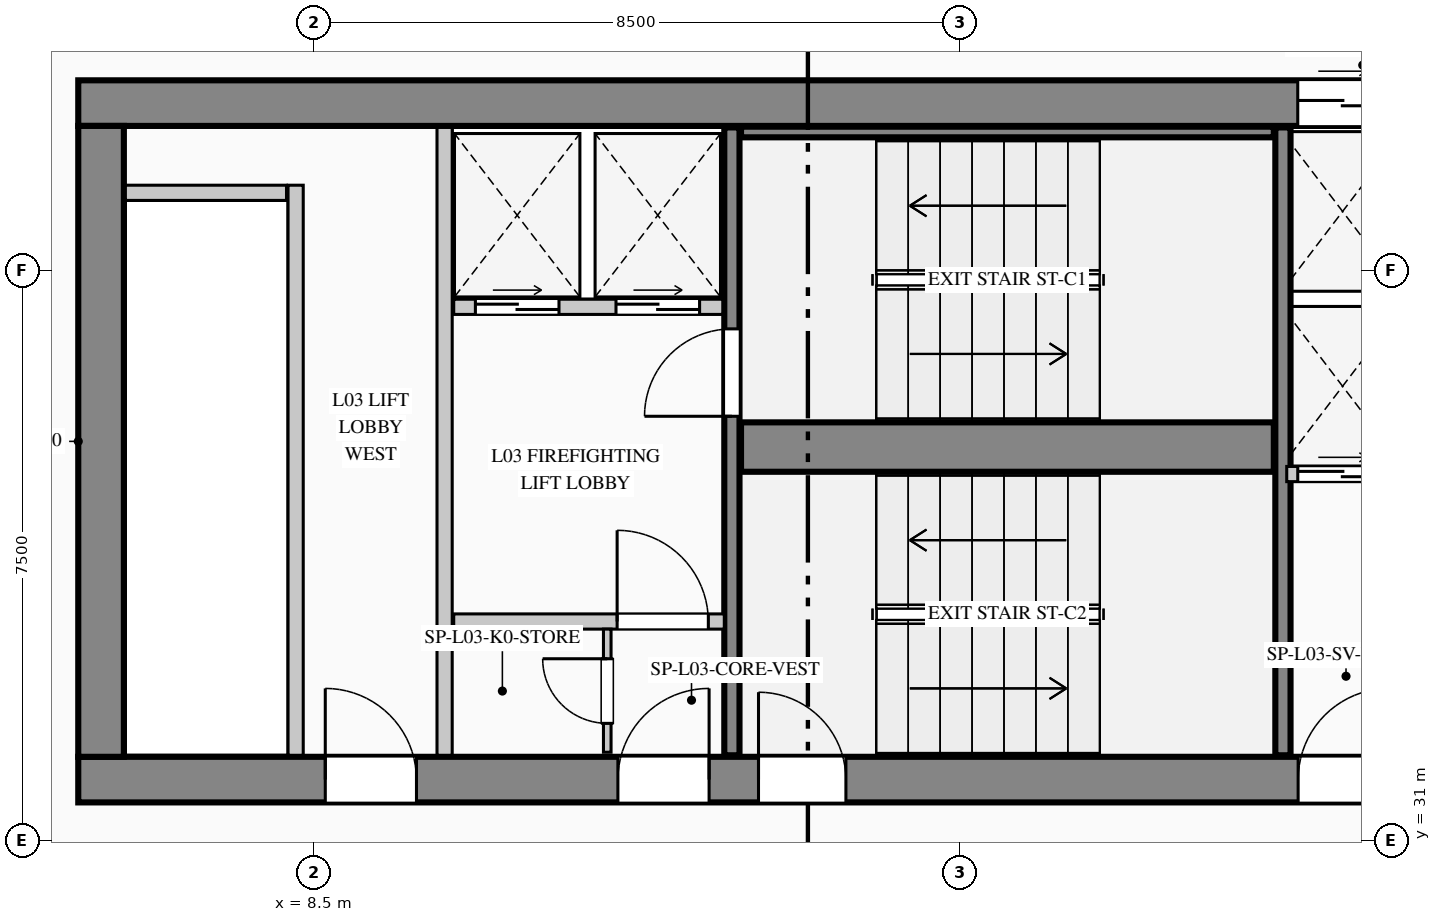
"""IFC4 building model, lengths in metres.
Left out: names, types, materials, properties, quantities, classifications, styles, units other than length and angle.
Written with IfcOpenShell. Run it as: python <this file> out.ifc"""

import sys

from ifc_helpers import new_model, si_unit, direction, frame, frame_2d, origin, place, context, subcontext, project, spatial, rectangle, extrude, element, fill, save


model = new_model("IFC4")
c1 = context("Model", 3, precision=1e-05, world=origin(), true_north=direction((0.0, 1.0)))
c2 = subcontext(c1, "Body", "Model", "MODEL_VIEW")
j1 = project(units=[si_unit("LENGTHUNIT", "METRE"), si_unit("PLANEANGLEUNIT", "RADIAN")], contexts=[c1])
p1 = place(None, origin())
s1 = spatial("IfcSite", under=j1, at=p1, CompositionType="ELEMENT")
p2 = place(p1, origin())
s2 = spatial("IfcBuilding", under=s1, at=p2, CompositionType="ELEMENT")
p3 = place(p2, frame((0.0, 0.0, 10.8)))
s3 = spatial("IfcBuildingStorey", under=s2, at=p3, CompositionType="ELEMENT", Elevation=10.8)
p4 = place(p3, frame((5.4, 40.7, 0.0), z_axis=(0.0, 0.0, 1.0), x_axis=(1.0, 0.0, 0.0)))
e1 = element("IfcWall", 1, at=p4, inside=s3, PredefinedType="SHEAR", context=c2, shape_type="SweptSolid", body=[
    extrude(rectangle(XDim=18.05, YDim=0.6, at=frame_2d((9.025, 0.0))), origin(), (0.0, 0.0, 1.0), 5.4),
])
p5 = place(p4, frame((16.045, 0.0, 0.0)))
e2 = element("IfcOpeningElement", 2, at=p5, cuts=e1, PredefinedType="OPENING", context=c2, shape_type="SweptSolid", body=[
    extrude(rectangle(XDim=1.18, YDim=2.25, at=frame_2d((0.59, 1.125))), frame((0.0, 0.31, 0.0), z_axis=(0.0, -1.0, 0.0), x_axis=(1.0, 0.0, 0.0)), (0.0, 0.0, 1.0), 0.62),
])
p6 = place(p3, frame((5.4, 31.8, 0.0), z_axis=(0.0, 0.0, 1.0), x_axis=(1.0, 0.0, 0.0)))
e3 = element("IfcWall", 3, at=p6, inside=s3, PredefinedType="SHEAR", context=c2, shape_type="SweptSolid", body=[
    extrude(rectangle(XDim=18.05, YDim=0.6, at=frame_2d((9.025, 0.0))), origin(), (0.0, 0.0, 1.0), 5.4),
])
p7 = place(p6, frame((3.25, 0.0, 0.0)))
e4 = element("IfcOpeningElement", 4, at=p7, cuts=e3, PredefinedType="OPENING", context=c2, shape_type="SweptSolid", body=[
    extrude(rectangle(XDim=1.2, YDim=2.2, at=frame_2d((0.6, 1.1))), frame((0.0, 0.31, 0.0), z_axis=(0.0, -1.0, 0.0), x_axis=(1.0, 0.0, 0.0)), (0.0, 0.0, 1.0), 0.62),
])
p8 = place(p6, frame((7.1, 0.0, 0.0)))
e5 = element("IfcOpeningElement", 5, at=p8, cuts=e3, PredefinedType="OPENING", context=c2, shape_type="SweptSolid", body=[
    extrude(rectangle(XDim=1.2, YDim=2.2, at=frame_2d((0.6, 1.1))), frame((0.0, 0.31, 0.0), z_axis=(0.0, -1.0, 0.0), x_axis=(1.0, 0.0, 0.0)), (0.0, 0.0, 1.0), 0.62),
])
p9 = place(p6, frame((8.95, 0.0, 0.0)))
e6 = element("IfcOpeningElement", 6, at=p9, cuts=e3, PredefinedType="OPENING", context=c2, shape_type="SweptSolid", body=[
    extrude(rectangle(XDim=1.15, YDim=2.2, at=frame_2d((0.575, 1.1))), frame((0.0, 0.31, 0.0), z_axis=(0.0, -1.0, 0.0), x_axis=(1.0, 0.0, 0.0)), (0.0, 0.0, 1.0), 0.62),
])
p10 = place(p6, frame((16.05, 0.0, 0.0)))
e7 = element("IfcOpeningElement", 7, at=p10, cuts=e3, PredefinedType="OPENING", context=c2, shape_type="SweptSolid", body=[
    extrude(rectangle(XDim=1.2, YDim=2.2, at=frame_2d((0.6, 1.1))), frame((0.0, 0.31, 0.0), z_axis=(0.0, -1.0, 0.0), x_axis=(1.0, 0.0, 0.0)), (0.0, 0.0, 1.0), 0.62),
])
p11 = place(p3, frame((5.7, 32.1, 0.0), z_axis=(0.0, 0.0, 1.0), x_axis=(0.0, 1.0, 0.0)))
e8 = element("IfcWall", 8, at=p11, inside=s3, PredefinedType="SHEAR", context=c2, shape_type="SweptSolid", body=[
    extrude(rectangle(XDim=8.3, YDim=0.6, at=frame_2d((4.15, 0.0))), origin(), (0.0, 0.0, 1.0), 5.4),
])
p12 = place(p3, frame((14.0, 32.12, 0.0), z_axis=(0.0, 0.0, 1.0), x_axis=(0.0, 1.0, 0.0)))
e9 = element("IfcWall", 9, at=p12, inside=s3, PredefinedType="SHEAR", context=c2, shape_type="SweptSolid", body=[
    extrude(rectangle(XDim=8.26, YDim=0.2, at=frame_2d((4.13, 0.0))), origin(), (0.0, 0.0, 1.0), 5.4),
])
p13 = place(p12, frame((4.46, 0.0, 0.0)))
e10 = element("IfcOpeningElement", 10, at=p13, cuts=e9, PredefinedType="OPENING", context=c2, shape_type="SweptSolid", body=[
    extrude(rectangle(XDim=1.15, YDim=2.2, at=frame_2d((0.575, 1.1))), frame((0.0, 0.11, 0.0), z_axis=(0.0, -1.0, 0.0), x_axis=(1.0, 0.0, 0.0)), (0.0, 0.0, 1.0), 0.22),
])
p14 = place(p3, frame((14.12, 36.175, 0.0), z_axis=(0.0, 0.0, 1.0), x_axis=(1.0, 0.0, 0.0)))
e11 = element("IfcWall", 11, at=p14, inside=s3, PredefinedType="SHEAR", context=c2, shape_type="SweptSolid", body=[
    extrude(rectangle(XDim=7.01, YDim=0.65, at=frame_2d((3.505, 0.0))), origin(), (0.0, 0.0, 1.0), 5.4),
])
p15 = place(p3, frame((21.25, 32.12, 0.0), z_axis=(0.0, 0.0, 1.0), x_axis=(0.0, 1.0, 0.0)))
e12 = element("IfcWall", 12, at=p15, inside=s3, PredefinedType="SHEAR", context=c2, shape_type="SweptSolid", body=[
    extrude(rectangle(XDim=8.26, YDim=0.2, at=frame_2d((4.13, 0.0))), origin(), (0.0, 0.0, 1.0), 5.4),
])
p16 = place(p3, frame((14.12, 40.32, 0.0), z_axis=(0.0, 0.0, 1.0), x_axis=(1.0, 0.0, 0.0)))
e13 = element("IfcWall", 13, at=p16, inside=s3, PredefinedType="SHEAR", context=c2, shape_type="SweptSolid", body=[
    extrude(rectangle(XDim=7.01, YDim=0.14, at=frame_2d((3.505, 0.0))), origin(), (0.0, 0.0, 1.0), 5.4),
])
p17 = place(p3, frame((8.26, 32.12, 0.0), z_axis=(0.0, 0.0, 1.0), x_axis=(0.0, 1.0, 0.0)))
e14 = element("IfcWall", 14, at=p17, inside=s3, PredefinedType="PARTITIONING", context=c2, shape_type="SweptSolid", body=[
    extrude(rectangle(XDim=7.5, YDim=0.2, at=frame_2d((3.75, 0.0))), origin(), (0.0, 0.0, 1.0), 5.08),
])
p18 = place(p3, frame((6.02, 39.52, 0.0), z_axis=(0.0, 0.0, 1.0), x_axis=(1.0, 0.0, 0.0)))
e15 = element("IfcWall", 15, at=p18, inside=s3, PredefinedType="PARTITIONING", context=c2, shape_type="SweptSolid", body=[
    extrude(rectangle(XDim=2.12, YDim=0.2, at=frame_2d((1.06, 0.0))), origin(), (0.0, 0.0, 1.0), 5.08),
])
p19 = place(p3, frame((10.22, 32.12, 0.0), z_axis=(0.0, 0.0, 1.0), x_axis=(0.0, 1.0, 0.0)))
e16 = element("IfcWall", 16, at=p19, inside=s3, PredefinedType="PARTITIONING", context=c2, shape_type="SweptSolid", body=[
    extrude(rectangle(XDim=8.26, YDim=0.2, at=frame_2d((4.13, 0.0))), origin(), (0.0, 0.0, 1.0), 5.08),
])
p20 = place(p3, frame((10.34, 38.02, 0.0), z_axis=(0.0, 0.0, 1.0), x_axis=(1.0, 0.0, 0.0)))
e17 = element("IfcWall", 17, at=p20, inside=s3, PredefinedType="PARTITIONING", context=c2, shape_type="SweptSolid", body=[
    extrude(rectangle(XDim=3.54, YDim=0.2, at=frame_2d((1.77, 0.0))), origin(), (0.0, 0.0, 1.0), 5.08),
])
p21 = place(p20, frame((0.285, 0.0, 0.0)))
e18 = element("IfcOpeningElement", 18, at=p21, cuts=e17, PredefinedType="OPENING", context=c2, shape_type="SweptSolid", body=[
    extrude(rectangle(XDim=1.1, YDim=2.2, at=frame_2d((0.55, 1.1))), frame((0.0, 0.11, 0.0), z_axis=(0.0, -1.0, 0.0), x_axis=(1.0, 0.0, 0.0)), (0.0, 0.0, 1.0), 0.22),
])
p22 = place(p20, frame((2.135, 0.0, 0.0)))
e19 = element("IfcOpeningElement", 19, at=p22, cuts=e17, PredefinedType="OPENING", context=c2, shape_type="SweptSolid", body=[
    extrude(rectangle(XDim=1.1, YDim=2.2, at=frame_2d((0.55, 1.1))), frame((0.0, 0.11, 0.0), z_axis=(0.0, -1.0, 0.0), x_axis=(1.0, 0.0, 0.0)), (0.0, 0.0, 1.0), 0.22),
])
p23 = place(p3, frame((10.34, 33.88, 0.0), z_axis=(0.0, 0.0, 1.0), x_axis=(1.0, 0.0, 0.0)))
e20 = element("IfcWall", 20, at=p23, inside=s3, PredefinedType="PARTITIONING", context=c2, shape_type="SweptSolid", body=[
    extrude(rectangle(XDim=3.56, YDim=0.2, at=frame_2d((1.78, 0.0))), origin(), (0.0, 0.0, 1.0), 5.08),
])
p24 = place(p23, frame((2.15, 0.0, 0.0)))
e21 = element("IfcOpeningElement", 21, at=p24, cuts=e20, PredefinedType="OPENING", context=c2, shape_type="SweptSolid", body=[
    extrude(rectangle(XDim=1.2, YDim=2.2, at=frame_2d((0.6, 1.1))), frame((0.0, 0.11, 0.0), z_axis=(0.0, -1.0, 0.0), x_axis=(1.0, 0.0, 0.0)), (0.0, 0.0, 1.0), 0.22),
])
p25 = place(p3, frame((12.36, 32.16, 0.0), z_axis=(0.0, 0.0, 1.0), x_axis=(0.0, 1.0, 0.0)))
e22 = element("IfcWall", 22, at=p25, inside=s3, PredefinedType="PARTITIONING", context=c2, shape_type="SweptSolid", body=[
    extrude(rectangle(XDim=1.62, YDim=0.1, at=frame_2d((0.81, 0.0))), origin(), (0.0, 0.0, 1.0), 5.08),
])
p26 = place(p25, frame((0.38, 0.0, 0.0)))
e23 = element("IfcOpeningElement", 23, at=p26, cuts=e22, PredefinedType="OPENING", context=c2, shape_type="SweptSolid", body=[
    extrude(rectangle(XDim=0.85, YDim=2.1, at=frame_2d((0.425, 1.05))), frame((0.0, 0.06, 0.0), z_axis=(0.0, -1.0, 0.0), x_axis=(1.0, 0.0, 0.0)), (0.0, 0.0, 1.0), 0.12),
])
p27 = place(p3, frame((21.3, 35.82, 0.0), z_axis=(0.0, 0.0, 1.0), x_axis=(1.0, 0.0, 0.0)))
e24 = element("IfcWall", 24, at=p27, inside=s3, PredefinedType="PARTITIONING", context=c2, shape_type="SweptSolid", body=[
    extrude(rectangle(XDim=1.5, YDim=0.2, at=frame_2d((0.75, 0.0))), origin(), (0.0, 0.0, 1.0), 5.08),
])
p28 = place(p27, frame((0.145, 0.0, 0.0)))
e25 = element("IfcOpeningElement", 25, at=p28, cuts=e24, PredefinedType="OPENING", context=c2, shape_type="SweptSolid", body=[
    extrude(rectangle(XDim=1.18, YDim=2.25, at=frame_2d((0.59, 1.125))), frame((0.0, 0.11, 0.0), z_axis=(0.0, -1.0, 0.0), x_axis=(1.0, 0.0, 0.0)), (0.0, 0.0, 1.0), 0.22),
])
p29 = place(p7, origin())
e26 = element("IfcDoor", 26, at=p29, inside=s3, OperationType="SINGLE_SWING_LEFT", PredefinedType="DOOR", context=c2, shape_type="SweptSolid", body=[
    extrude(rectangle(XDim=1.2, YDim=2.2, at=frame_2d((0.6, 1.1))), frame((0.0, 0.025, 0.0), z_axis=(0.0, -1.0, 0.0), x_axis=(1.0, 0.0, 0.0)), (0.0, 0.0, 1.0), 0.05),
])
fill(e4, e26)
p30 = place(p8, origin())
e27 = element("IfcDoor", 27, at=p30, inside=s3, OperationType="SINGLE_SWING_RIGHT", PredefinedType="DOOR", context=c2, shape_type="SweptSolid", body=[
    extrude(rectangle(XDim=1.2, YDim=2.2, at=frame_2d((0.6, 1.1))), frame((0.0, 0.025, 0.0), z_axis=(0.0, -1.0, 0.0), x_axis=(1.0, 0.0, 0.0)), (0.0, 0.0, 1.0), 0.05),
])
fill(e5, e27)
p31 = place(p9, origin())
e28 = element("IfcDoor", 28, at=p31, inside=s3, OperationType="SINGLE_SWING_LEFT", PredefinedType="DOOR", context=c2, shape_type="SweptSolid", body=[
    extrude(rectangle(XDim=1.15, YDim=2.2, at=frame_2d((0.575, 1.1))), frame((0.0, 0.025, 0.0), z_axis=(0.0, -1.0, 0.0), x_axis=(1.0, 0.0, 0.0)), (0.0, 0.0, 1.0), 0.05),
])
fill(e6, e28)
p32 = place(p10, origin())
e29 = element("IfcDoor", 29, at=p32, inside=s3, OperationType="SINGLE_SWING_RIGHT", PredefinedType="DOOR", context=c2, shape_type="SweptSolid", body=[
    extrude(rectangle(XDim=1.2, YDim=2.2, at=frame_2d((0.6, 1.1))), frame((0.0, 0.025, 0.0), z_axis=(0.0, -1.0, 0.0), x_axis=(1.0, 0.0, 0.0)), (0.0, 0.0, 1.0), 0.05),
])
fill(e7, e29)
p33 = place(p24, origin())
e30 = element("IfcDoor", 30, at=p33, inside=s3, OperationType="SINGLE_SWING_LEFT", PredefinedType="DOOR", context=c2, shape_type="SweptSolid", body=[
    extrude(rectangle(XDim=1.2, YDim=2.2, at=frame_2d((0.6, 1.1))), frame((0.0, 0.025, 0.0), z_axis=(0.0, -1.0, 0.0), x_axis=(1.0, 0.0, 0.0)), (0.0, 0.0, 1.0), 0.05),
])
fill(e21, e30)
p34 = place(p26, origin())
e31 = element("IfcDoor", 31, at=p34, inside=s3, OperationType="SINGLE_SWING_RIGHT", PredefinedType="DOOR", context=c2, shape_type="SweptSolid", body=[
    extrude(rectangle(XDim=0.85, YDim=2.1, at=frame_2d((0.425, 1.05))), frame((0.0, 0.025, 0.0), z_axis=(0.0, -1.0, 0.0), x_axis=(1.0, 0.0, 0.0)), (0.0, 0.0, 1.0), 0.05),
])
fill(e23, e31)
p35 = place(p13, origin())
e32 = element("IfcDoor", 32, at=p35, inside=s3, OperationType="SINGLE_SWING_LEFT", PredefinedType="DOOR", context=c2, shape_type="SweptSolid", body=[
    extrude(rectangle(XDim=1.15, YDim=2.2, at=frame_2d((0.575, 1.1))), frame((0.0, 0.025, 0.0), z_axis=(0.0, -1.0, 0.0), x_axis=(1.0, 0.0, 0.0)), (0.0, 0.0, 1.0), 0.05),
])
fill(e10, e32)
p36 = place(p21, origin())
e33 = element("IfcDoor", 33, at=p36, inside=s3, OperationType="DOUBLE_DOOR_SLIDING", PredefinedType="DOOR", context=c2, shape_type="SweptSolid", body=[
    extrude(rectangle(XDim=1.1, YDim=2.2, at=frame_2d((0.55, 1.1))), frame((0.0, 0.025, 0.0), z_axis=(0.0, -1.0, 0.0), x_axis=(1.0, 0.0, 0.0)), (0.0, 0.0, 1.0), 0.05),
])
fill(e18, e33)
p37 = place(p22, origin())
e34 = element("IfcDoor", 34, at=p37, inside=s3, OperationType="DOUBLE_DOOR_SLIDING", PredefinedType="DOOR", context=c2, shape_type="SweptSolid", body=[
    extrude(rectangle(XDim=1.1, YDim=2.2, at=frame_2d((0.55, 1.1))), frame((0.0, 0.025, 0.0), z_axis=(0.0, -1.0, 0.0), x_axis=(1.0, 0.0, 0.0)), (0.0, 0.0, 1.0), 0.05),
])
fill(e19, e34)
p38 = place(p5, origin())
e35 = element("IfcDoor", 35, at=p38, inside=s3, OperationType="DOUBLE_DOOR_SLIDING", PredefinedType="DOOR", context=c2, shape_type="SweptSolid", body=[
    extrude(rectangle(XDim=1.18, YDim=2.25, at=frame_2d((0.59, 1.125))), frame((0.0, 0.025, 0.0), z_axis=(0.0, -1.0, 0.0), x_axis=(1.0, 0.0, 0.0)), (0.0, 0.0, 1.0), 0.05),
])
fill(e2, e35)
p39 = place(p28, origin())
e36 = element("IfcDoor", 36, at=p39, inside=s3, OperationType="DOUBLE_DOOR_SLIDING", PredefinedType="DOOR", context=c2, shape_type="SweptSolid", body=[
    extrude(rectangle(XDim=1.18, YDim=2.25, at=frame_2d((0.59, 1.125))), frame((0.0, 0.025, 0.0), z_axis=(0.0, -1.0, 0.0), x_axis=(1.0, 0.0, 0.0)), (0.0, 0.0, 1.0), 0.05),
])
fill(e25, e36)
save(model, sys.argv[1])
